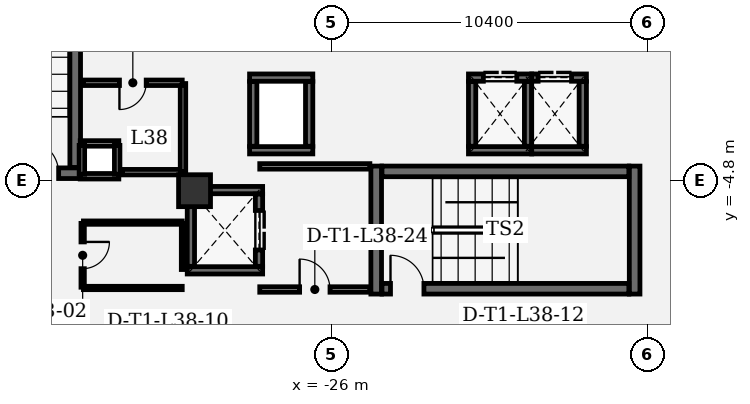
"""IFC4 building model, lengths in metres.
Left out: names, types, materials, properties, quantities, classifications, styles, units other than length and angle.
Written with IfcOpenShell. Run it as: python <this file> out.ifc"""

import sys

from ifc_helpers import new_model, si_unit, direction, frame, frame_2d, origin, origin_2d, place, context, subcontext, project, spatial, rectangle, extrude, element, fill, save


model = new_model("IFC4")
c1 = context("Model", 3, precision=1e-05, world=origin(), true_north=direction((0.0, 1.0)))
c2 = subcontext(c1, "Body", "Model", "MODEL_VIEW")
j1 = project(units=[si_unit("LENGTHUNIT", "METRE"), si_unit("PLANEANGLEUNIT", "RADIAN")], contexts=[c1])
p1 = place(None, origin())
s1 = spatial("IfcSite", under=j1, at=p1, CompositionType="ELEMENT")
p2 = place(p1, origin())
s2 = spatial("IfcBuilding", under=s1, at=p2, CompositionType="ELEMENT")
p3 = place(p2, frame((0.0, 0.0, 166.5)))
s3 = spatial("IfcBuildingStorey", under=s2, at=p3, CompositionType="ELEMENT", Elevation=166.5)
p4 = place(p3, frame((-30.5, -5.15, 0.0), z_axis=(0.0, 0.0, 1.0), x_axis=(1.0, 0.0, 0.0)))
e1 = element("IfcColumn", 1, at=p4, inside=s3, PredefinedType="COLUMN", context=c2, shape_type="SweptSolid", body=[
    extrude(rectangle(XDim=1.05, YDim=1.05, at=origin_2d()), origin(), (0.0, 0.0, 1.0), 4.05),
])
for number, where, z_axis, x_axis in (
    (2, (-24.525, -4.34, 0.0), (0.0, 0.0, 1.0), (0.0, -1.0, 0.0)),
    (3, (-16.025, -8.55, 0.0), (0.0, 0.0, 1.0), (0.0, 1.0, 0.0)),
):
    element("IfcWall", number, at=place(p3, frame(where, z_axis=z_axis, x_axis=x_axis)), inside=s3, PredefinedType="SHEAR", context=c2, shape_type="SweptSolid", body=[
        extrude(rectangle(XDim=4.21, YDim=0.35, at=frame_2d((2.105, 0.0))), origin(), (0.0, 0.0, 1.0), 3.78),
    ])
p5 = place(p3, frame((-24.335, -8.375, 0.0), z_axis=(0.0, 0.0, 1.0), x_axis=(1.0, 0.0, 0.0)))
e4 = element("IfcWall", 4, at=p5, inside=s3, PredefinedType="SHEAR", context=c2, shape_type="SweptSolid", body=[
    extrude(rectangle(XDim=8.12, YDim=0.35, at=frame_2d((4.06, 0.0))), origin(), (0.0, 0.0, 1.0), 3.78),
])
p6 = place(p5, frame((0.28, 0.0, 0.0)))
e5 = element("IfcOpeningElement", 5, at=p6, cuts=e4, PredefinedType="OPENING", context=c2, shape_type="SweptSolid", body=[
    extrude(rectangle(XDim=1.1, YDim=2.2, at=frame_2d((0.55, 1.1))), frame((0.0, 0.185, 0.0), z_axis=(0.0, -1.0, 0.0), x_axis=(1.0, 0.0, 0.0)), (0.0, 0.0, 1.0), 0.37),
])
p7 = place(p3, frame((-16.215, -4.515, 0.0), z_axis=(0.0, 0.0, 1.0), x_axis=(-1.0, 0.0, 0.0)))
e6 = element("IfcWall", 6, at=p7, inside=s3, PredefinedType="SHEAR", context=c2, shape_type="SweptSolid", body=[
    extrude(rectangle(XDim=8.12, YDim=0.35, at=frame_2d((4.06, 0.0))), origin(), (0.0, 0.0, 1.0), 3.78),
])
p8 = place(p3, frame((-38.46, -4.575, 0.0), z_axis=(0.0, 0.0, 1.0), x_axis=(1.0, 0.0, 0.0)))
e7 = element("IfcWall", 7, at=p8, inside=s3, PredefinedType="SHEAR", context=c2, shape_type="SweptSolid", body=[
    extrude(rectangle(XDim=4.21, YDim=0.35, at=frame_2d((2.105, 0.0))), origin(), (0.0, 0.0, 1.0), 3.78),
])
p9 = place(p8, frame((2.39, 0.0, 0.0)))
e8 = element("IfcOpeningElement", 8, at=p9, cuts=e7, PredefinedType="OPENING", context=c2, shape_type="SweptSolid", body=[
    extrude(rectangle(XDim=1.1, YDim=2.2, at=frame_2d((0.55, 1.1))), frame((0.0, 0.185, 0.0), z_axis=(0.0, -1.0, 0.0), x_axis=(1.0, 0.0, 0.0)), (0.0, 0.0, 1.0), 0.37),
])
p10 = place(p3, frame((-34.425, -4.385, 0.0), z_axis=(0.0, 0.0, 1.0), x_axis=(0.0, 1.0, 0.0)))
e9 = element("IfcWall", 9, at=p10, inside=s3, PredefinedType="SHEAR", context=c2, shape_type="SweptSolid", body=[
    extrude(rectangle(XDim=8.77, YDim=0.35, at=frame_2d((4.385, 0.0))), origin(), (0.0, 0.0, 1.0), 3.78),
])
for number, where, z_axis, x_axis in (
    (10, (-28.26, -7.77, 0.0), (0.0, 0.0, 1.0), (-1.0, 0.0, 0.0)),
    (11, (-30.74, -5.13, 0.0), (0.0, 0.0, 1.0), (1.0, 0.0, 0.0)),
):
    element("IfcWall", number, at=place(p3, frame(where, z_axis=z_axis, x_axis=x_axis)), inside=s3, PredefinedType="SHEAR", context=c2, shape_type="SweptSolid", body=[
        extrude(rectangle(XDim=2.48, YDim=0.24, at=frame_2d((1.24, 0.0))), origin(), (0.0, 0.0, 1.0), 3.78),
    ])
p11 = place(p3, frame((-30.62, -7.638, 0.0), z_axis=(0.0, 0.0, 1.0), x_axis=(0.0, 1.0, 0.0)))
e12 = element("IfcWall", 12, at=p11, inside=s3, PredefinedType="SHEAR", context=c2, shape_type="SweptSolid", body=[
    extrude(rectangle(XDim=2.376, YDim=0.24, at=frame_2d((1.188, 0.0))), origin(), (0.0, 0.0, 1.0), 3.78),
])
p12 = place(p3, frame((-28.38, -5.262, 0.0), z_axis=(0.0, 0.0, 1.0), x_axis=(0.0, -1.0, 0.0)))
e13 = element("IfcWall", 13, at=p12, inside=s3, PredefinedType="SHEAR", context=c2, shape_type="SweptSolid", body=[
    extrude(rectangle(XDim=2.376, YDim=0.24, at=frame_2d((1.188, 0.0))), origin(), (0.0, 0.0, 1.0), 3.78),
])
p13 = place(p12, frame((0.538, 0.0, 0.0)))
e14 = element("IfcOpeningElement", 14, at=p13, cuts=e13, PredefinedType="OPENING", context=c2, shape_type="SweptSolid", body=[
    extrude(rectangle(XDim=1.3, YDim=2.3, at=frame_2d((0.65, 1.15))), frame((0.0, 0.13, 0.0), z_axis=(0.0, -1.0, 0.0), x_axis=(1.0, 0.0, 0.0)), (0.0, 0.0, 1.0), 0.26),
])
for number, where, z_axis, x_axis in (
    (15, (-26.61, -3.82, 0.0), (0.0, 0.0, 1.0), (-1.0, 0.0, 0.0)),
    (16, (-28.69, -1.43, 0.0), (0.0, 0.0, 1.0), (1.0, 0.0, 0.0)),
):
    element("IfcWall", number, at=place(p3, frame(where, z_axis=z_axis, x_axis=x_axis)), inside=s3, PredefinedType="SHEAR", context=c2, shape_type="SweptSolid", body=[
        extrude(rectangle(XDim=2.08, YDim=0.24, at=frame_2d((1.04, 0.0))), origin(), (0.0, 0.0, 1.0), 3.78),
    ])
for number, where, z_axis, x_axis in (
    (17, (-28.57, -3.688, 0.0), (0.0, 0.0, 1.0), (0.0, 1.0, 0.0)),
    (18, (-26.73, -1.562, 0.0), (0.0, 0.0, 1.0), (0.0, -1.0, 0.0)),
):
    element("IfcWall", number, at=place(p3, frame(where, z_axis=z_axis, x_axis=x_axis)), inside=s3, PredefinedType="SHEAR", context=c2, shape_type="SweptSolid", body=[
        extrude(rectangle(XDim=2.126, YDim=0.24, at=frame_2d((1.063, 0.0))), origin(), (0.0, 0.0, 1.0), 3.78),
    ])
p14 = place(p3, frame((-19.41, -3.82, 0.0), z_axis=(0.0, 0.0, 1.0), x_axis=(-1.0, 0.0, 0.0)))
e19 = element("IfcWall", 19, at=p14, inside=s3, PredefinedType="SHEAR", context=c2, shape_type="SweptSolid", body=[
    extrude(rectangle(XDim=2.08, YDim=0.24, at=frame_2d((1.04, 0.0))), origin(), (0.0, 0.0, 1.0), 3.78),
])
p15 = place(p3, frame((-21.49, -1.43, 0.0), z_axis=(0.0, 0.0, 1.0), x_axis=(1.0, 0.0, 0.0)))
e20 = element("IfcWall", 20, at=p15, inside=s3, PredefinedType="SHEAR", context=c2, shape_type="SweptSolid", body=[
    extrude(rectangle(XDim=2.08, YDim=0.24, at=frame_2d((1.04, 0.0))), origin(), (0.0, 0.0, 1.0), 3.78),
])
p16 = place(p15, frame((0.49, 0.0, 0.0)))
e21 = element("IfcOpeningElement", 21, at=p16, cuts=e20, PredefinedType="OPENING", context=c2, shape_type="SweptSolid", body=[
    extrude(rectangle(XDim=1.1, YDim=2.2, at=frame_2d((0.55, 1.1))), frame((0.0, 0.13, 0.0), z_axis=(0.0, -1.0, 0.0), x_axis=(1.0, 0.0, 0.0)), (0.0, 0.0, 1.0), 0.26),
])
for number, where, z_axis, x_axis in (
    (22, (-21.37, -3.688, 0.0), (0.0, 0.0, 1.0), (0.0, 1.0, 0.0)),
    (23, (-19.53, -1.562, 0.0), (0.0, 0.0, 1.0), (0.0, -1.0, 0.0)),
):
    element("IfcWall", number, at=place(p3, frame(where, z_axis=z_axis, x_axis=x_axis)), inside=s3, PredefinedType="SHEAR", context=c2, shape_type="SweptSolid", body=[
        extrude(rectangle(XDim=2.126, YDim=0.24, at=frame_2d((1.063, 0.0))), origin(), (0.0, 0.0, 1.0), 3.78),
    ])
p17 = place(p3, frame((-17.61, -3.82, 0.0), z_axis=(0.0, 0.0, 1.0), x_axis=(-1.0, 0.0, 0.0)))
e24 = element("IfcWall", 24, at=p17, inside=s3, PredefinedType="SHEAR", context=c2, shape_type="SweptSolid", body=[
    extrude(rectangle(XDim=1.8, YDim=0.24, at=frame_2d((0.9, 0.0))), origin(), (0.0, 0.0, 1.0), 3.78),
])
p18 = place(p3, frame((-19.41, -1.43, 0.0), z_axis=(0.0, 0.0, 1.0), x_axis=(1.0, 0.0, 0.0)))
e25 = element("IfcWall", 25, at=p18, inside=s3, PredefinedType="SHEAR", context=c2, shape_type="SweptSolid", body=[
    extrude(rectangle(XDim=1.8, YDim=0.24, at=frame_2d((0.9, 0.0))), origin(), (0.0, 0.0, 1.0), 3.78),
])
p19 = place(p18, frame((0.21, 0.0, 0.0)))
e26 = element("IfcOpeningElement", 26, at=p19, cuts=e25, PredefinedType="OPENING", context=c2, shape_type="SweptSolid", body=[
    extrude(rectangle(XDim=1.1, YDim=2.2, at=frame_2d((0.55, 1.1))), frame((0.0, 0.13, 0.0), z_axis=(0.0, -1.0, 0.0), x_axis=(1.0, 0.0, 0.0)), (0.0, 0.0, 1.0), 0.26),
])
p20 = place(p3, frame((-17.73, -1.562, 0.0), z_axis=(0.0, 0.0, 1.0), x_axis=(0.0, -1.0, 0.0)))
e27 = element("IfcWall", 27, at=p20, inside=s3, PredefinedType="SHEAR", context=c2, shape_type="SweptSolid", body=[
    extrude(rectangle(XDim=2.126, YDim=0.24, at=frame_2d((1.063, 0.0))), origin(), (0.0, 0.0, 1.0), 3.78),
])
for number, where, z_axis, x_axis in (
    (28, (-32.99, -4.675, 0.0), (0.0, 0.0, 1.0), (-1.0, 0.0, 0.0)),
    (29, (-34.26, -3.595, 0.0), (0.0, 0.0, 1.0), (1.0, 0.0, 0.0)),
):
    element("IfcWall", number, at=place(p3, frame(where, z_axis=z_axis, x_axis=x_axis)), inside=s3, PredefinedType="PARTITIONING", context=c2, shape_type="SweptSolid", body=[
        extrude(rectangle(XDim=1.27, YDim=0.18, at=frame_2d((0.635, 0.0))), origin(), (0.0, 0.0, 1.0), 3.78),
    ])
for number, where, z_axis, x_axis in (
    (30, (-34.205, -4.61, 0.0), (0.0, 0.0, 1.0), (0.0, 1.0, 0.0)),
    (31, (-33.045, -3.66, 0.0), (0.0, 0.0, 1.0), (0.0, -1.0, 0.0)),
):
    element("IfcWall", number, at=place(p3, frame(where, z_axis=z_axis, x_axis=x_axis)), inside=s3, PredefinedType="PARTITIONING", context=c2, shape_type="SweptSolid", body=[
        extrude(rectangle(XDim=0.95, YDim=0.18, at=frame_2d((0.475, 0.0))), origin(), (0.0, 0.0, 1.0), 3.78),
    ])
p21 = place(p3, frame((-28.355, -8.4, 0.0), z_axis=(0.0, 0.0, 1.0), x_axis=(1.0, 0.0, 0.0)))
e32 = element("IfcWall", 32, at=p21, inside=s3, PredefinedType="PARTITIONING", context=c2, shape_type="SweptSolid", body=[
    extrude(rectangle(XDim=3.622, YDim=0.18, at=frame_2d((1.811, 0.0))), origin(), (0.0, 0.0, 1.0), 3.78),
])
p22 = place(p21, frame((1.311, 0.0, 0.0)))
e33 = element("IfcOpeningElement", 33, at=p22, cuts=e32, PredefinedType="OPENING", context=c2, shape_type="SweptSolid", body=[
    extrude(rectangle(XDim=1.0, YDim=2.15, at=frame_2d((0.5, 1.075))), frame((0.0, 0.1, 0.0), z_axis=(0.0, -1.0, 0.0), x_axis=(1.0, 0.0, 0.0)), (0.0, 0.0, 1.0), 0.2),
])
p23 = place(p3, frame((-24.733, -4.35, 0.0), z_axis=(0.0, 0.0, 1.0), x_axis=(-1.0, 0.0, 0.0)))
e34 = element("IfcWall", 34, at=p23, inside=s3, PredefinedType="PARTITIONING", context=c2, shape_type="SweptSolid", body=[
    extrude(rectangle(XDim=3.622, YDim=0.18, at=frame_2d((1.811, 0.0))), origin(), (0.0, 0.0, 1.0), 3.78),
])
p24 = place(p3, frame((-34.18, -6.225, 0.0), z_axis=(0.0, 0.0, 1.0), x_axis=(0.0, -1.0, 0.0)))
e35 = element("IfcWall", 35, at=p24, inside=s3, PredefinedType="PARTITIONING", context=c2, shape_type="SweptSolid", body=[
    extrude(rectangle(XDim=2.1, YDim=0.11, at=frame_2d((1.05, 0.0))), origin(), (0.0, 0.0, 1.0), 3.78),
])
p25 = place(p24, frame((0.61, 0.0, 0.0)))
e36 = element("IfcOpeningElement", 36, at=p25, cuts=e35, PredefinedType="OPENING", context=c2, shape_type="SweptSolid", body=[
    extrude(rectangle(XDim=0.88, YDim=2.1, at=frame_2d((0.44, 1.05))), frame((0.0, 0.065, 0.0), z_axis=(0.0, -1.0, 0.0), x_axis=(1.0, 0.0, 0.0)), (0.0, 0.0, 1.0), 0.13),
])
p26 = place(p3, frame((-34.155, -8.35, 0.0), z_axis=(0.0, 0.0, 1.0), x_axis=(1.0, 0.0, 0.0)))
e37 = element("IfcWall", 37, at=p26, inside=s3, PredefinedType="PARTITIONING", context=c2, shape_type="SweptSolid", body=[
    extrude(rectangle(XDim=3.25, YDim=0.11, at=frame_2d((1.625, 0.0))), origin(), (0.0, 0.0, 1.0), 3.78),
])
p27 = place(p3, frame((-30.88, -7.743, 0.0), z_axis=(0.0, 0.0, 1.0), x_axis=(0.0, 1.0, 0.0)))
e38 = element("IfcWall", 38, at=p27, inside=s3, PredefinedType="PARTITIONING", context=c2, shape_type="SweptSolid", body=[
    extrude(rectangle(XDim=1.518, YDim=0.11, at=frame_2d((0.759, 0.0))), origin(), (0.0, 0.0, 1.0), 3.78),
])
p28 = place(p3, frame((-30.905, -6.2, 0.0), z_axis=(0.0, 0.0, 1.0), x_axis=(-1.0, 0.0, 0.0)))
e39 = element("IfcWall", 39, at=p28, inside=s3, PredefinedType="PARTITIONING", context=c2, shape_type="SweptSolid", body=[
    extrude(rectangle(XDim=3.25, YDim=0.11, at=frame_2d((1.625, 0.0))), origin(), (0.0, 0.0, 1.0), 3.344),
])
p29 = place(p3, frame((-32.88, -4.54, 0.0), z_axis=(0.0, 0.0, 1.0), x_axis=(1.0, 0.0, 0.0)))
e40 = element("IfcWall", 40, at=p29, inside=s3, PredefinedType="PARTITIONING", context=c2, shape_type="SweptSolid", body=[
    extrude(rectangle(XDim=1.975, YDim=0.18, at=frame_2d((0.988, 0.0))), origin(), (0.0, 0.0, 1.0), 3.78),
])
p30 = place(p3, frame((-30.88, -4.515, 0.0), z_axis=(0.0, 0.0, 1.0), x_axis=(0.0, 1.0, 0.0)))
e41 = element("IfcWall", 41, at=p30, inside=s3, PredefinedType="PARTITIONING", context=c2, shape_type="SweptSolid", body=[
    extrude(rectangle(XDim=2.89, YDim=0.18, at=frame_2d((1.445, 0.0))), origin(), (0.0, 0.0, 1.0), 3.78),
])
p31 = place(p3, frame((-30.905, -1.6, 0.0), z_axis=(0.0, 0.0, 1.0), x_axis=(-1.0, 0.0, 0.0)))
e42 = element("IfcWall", 42, at=p31, inside=s3, PredefinedType="PARTITIONING", context=c2, shape_type="SweptSolid", body=[
    extrude(rectangle(XDim=3.25, YDim=0.18, at=frame_2d((1.625, 0.0))), origin(), (0.0, 0.0, 1.0), 3.78),
])
p32 = place(p31, frame((1.185, 0.0, 0.0)))
e43 = element("IfcOpeningElement", 43, at=p32, cuts=e42, PredefinedType="OPENING", context=c2, shape_type="SweptSolid", body=[
    extrude(rectangle(XDim=0.88, YDim=2.1, at=frame_2d((0.44, 1.05))), frame((0.0, 0.1, 0.0), z_axis=(0.0, -1.0, 0.0), x_axis=(1.0, 0.0, 0.0)), (0.0, 0.0, 1.0), 0.2),
])
p33 = place(p6, origin())
e44 = element("IfcDoor", 44, at=p33, inside=s3, OperationType="SINGLE_SWING_LEFT", PredefinedType="DOOR", context=c2, shape_type="SweptSolid", body=[
    extrude(rectangle(XDim=1.1, YDim=2.2, at=frame_2d((0.55, 1.1))), frame((0.0, 0.025, 0.0), z_axis=(0.0, -1.0, 0.0), x_axis=(1.0, 0.0, 0.0)), (0.0, 0.0, 1.0), 0.05),
])
fill(e5, e44)
p34 = place(p9, origin())
e45 = element("IfcDoor", 45, at=p34, inside=s3, OperationType="SINGLE_SWING_LEFT", PredefinedType="DOOR", context=c2, shape_type="SweptSolid", body=[
    extrude(rectangle(XDim=1.1, YDim=2.2, at=frame_2d((0.55, 1.1))), frame((0.0, 0.025, 0.0), z_axis=(0.0, -1.0, 0.0), x_axis=(1.0, 0.0, 0.0)), (0.0, 0.0, 1.0), 0.05),
])
fill(e8, e45)
p35 = place(p13, origin())
e46 = element("IfcDoor", 46, at=p35, inside=s3, OperationType="DOUBLE_DOOR_SLIDING", PredefinedType="DOOR", context=c2, shape_type="SweptSolid", body=[
    extrude(rectangle(XDim=1.3, YDim=2.3, at=frame_2d((0.65, 1.15))), frame((0.0, 0.025, 0.0), z_axis=(0.0, -1.0, 0.0), x_axis=(1.0, 0.0, 0.0)), (0.0, 0.0, 1.0), 0.05),
])
fill(e14, e46)
p36 = place(p16, origin())
e47 = element("IfcDoor", 47, at=p36, inside=s3, OperationType="DOUBLE_DOOR_SLIDING", PredefinedType="DOOR", context=c2, shape_type="SweptSolid", body=[
    extrude(rectangle(XDim=1.1, YDim=2.2, at=frame_2d((0.55, 1.1))), frame((0.0, 0.025, 0.0), z_axis=(0.0, -1.0, 0.0), x_axis=(1.0, 0.0, 0.0)), (0.0, 0.0, 1.0), 0.05),
])
fill(e21, e47)
p37 = place(p19, origin())
e48 = element("IfcDoor", 48, at=p37, inside=s3, OperationType="DOUBLE_DOOR_SLIDING", PredefinedType="DOOR", context=c2, shape_type="SweptSolid", body=[
    extrude(rectangle(XDim=1.1, YDim=2.2, at=frame_2d((0.55, 1.1))), frame((0.0, 0.025, 0.0), z_axis=(0.0, -1.0, 0.0), x_axis=(1.0, 0.0, 0.0)), (0.0, 0.0, 1.0), 0.05),
])
fill(e26, e48)
p38 = place(p25, origin())
e49 = element("IfcDoor", 49, at=p38, inside=s3, OperationType="SINGLE_SWING_LEFT", PredefinedType="DOOR", context=c2, shape_type="SweptSolid", body=[
    extrude(rectangle(XDim=0.88, YDim=2.1, at=frame_2d((0.44, 1.05))), frame((0.0, 0.025, 0.0), z_axis=(0.0, -1.0, 0.0), x_axis=(1.0, 0.0, 0.0)), (0.0, 0.0, 1.0), 0.05),
])
fill(e36, e49)
p39 = place(p32, origin())
e50 = element("IfcDoor", 50, at=p39, inside=s3, OperationType="SINGLE_SWING_RIGHT", PredefinedType="DOOR", context=c2, shape_type="SweptSolid", body=[
    extrude(rectangle(XDim=0.88, YDim=2.1, at=frame_2d((0.44, 1.05))), frame((0.0, 0.025, 0.0), z_axis=(0.0, -1.0, 0.0), x_axis=(1.0, 0.0, 0.0)), (0.0, 0.0, 1.0), 0.05),
])
fill(e43, e50)
p40 = place(p22, origin())
e51 = element("IfcDoor", 51, at=p40, inside=s3, OperationType="SINGLE_SWING_LEFT", PredefinedType="DOOR", context=c2, shape_type="SweptSolid", body=[
    extrude(rectangle(XDim=1.0, YDim=2.15, at=frame_2d((0.5, 1.075))), frame((0.0, 0.025, 0.0), z_axis=(0.0, -1.0, 0.0), x_axis=(1.0, 0.0, 0.0)), (0.0, 0.0, 1.0), 0.05),
])
fill(e33, e51)
save(model, sys.argv[1])
